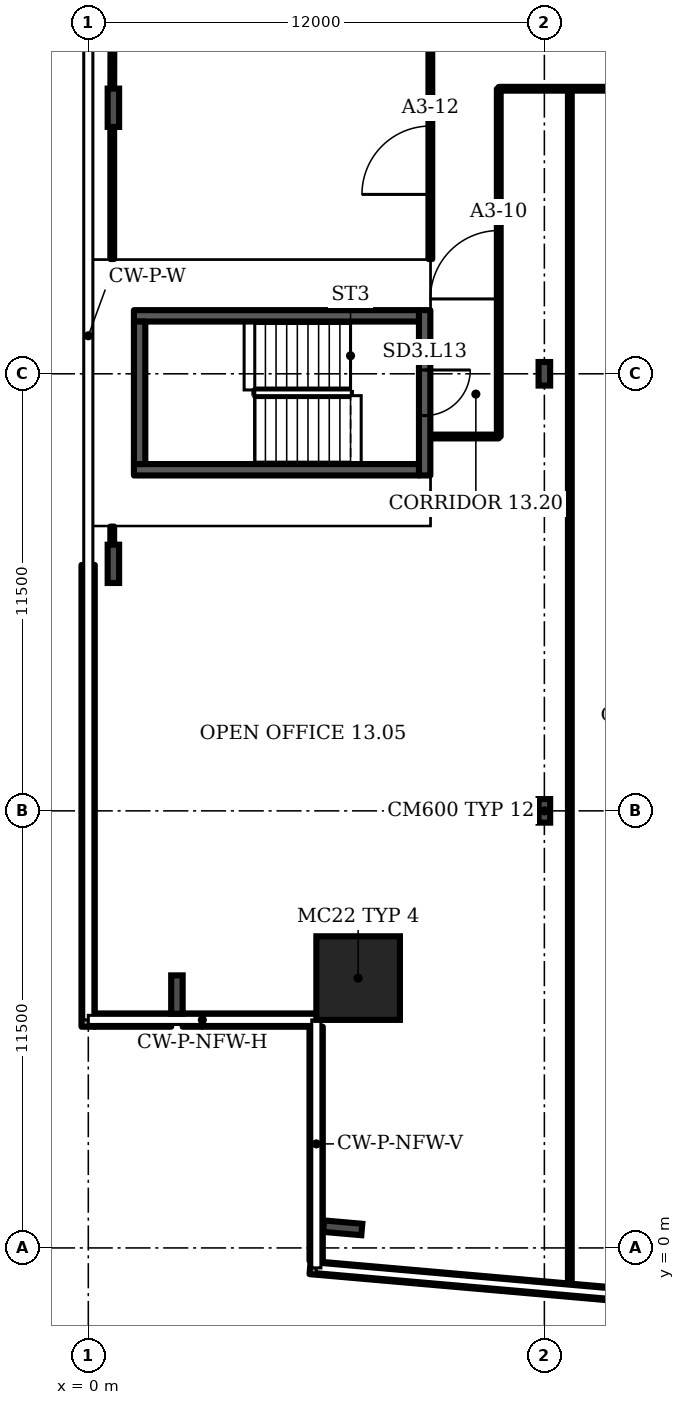
"""IFC4 building model, lengths in metres.
Left out: names, types, materials, properties, quantities, classifications, styles, units other than length and angle.
Written with IfcOpenShell. Run it as: python <this file> out.ifc"""

import sys

from ifc_helpers import new_model, si_unit, direction, frame, frame_2d, origin, origin_2d, place, context, subcontext, project, spatial, rectangle, i_section, extrude, element, fill, save


model = new_model("IFC4")
c1 = context("Model", 3, precision=1e-05, world=origin(), true_north=direction((0.0, 1.0)))
c2 = subcontext(c1, "Body", "Model", "MODEL_VIEW")
j1 = project(units=[si_unit("LENGTHUNIT", "METRE"), si_unit("PLANEANGLEUNIT", "RADIAN")], contexts=[c1])
p1 = place(None, origin())
s1 = spatial("IfcSite", under=j1, at=p1, CompositionType="ELEMENT")
p2 = place(p1, origin())
s2 = spatial("IfcBuilding", under=s1, at=p2, CompositionType="ELEMENT")
p3 = place(p2, frame((0.0, 0.0, 66.7)))
s3 = spatial("IfcBuildingStorey", under=s2, at=p3, CompositionType="ELEMENT", Elevation=66.7)
p4 = place(p3, frame((7.1, 7.1, 0.0), z_axis=(0.0, 0.0, 1.0), x_axis=(1.0, 0.0, 0.0)))
e1 = element("IfcColumn", 1, at=p4, inside=s3, PredefinedType="COLUMN", context=c2, shape_type="SweptSolid", body=[
    extrude(rectangle(XDim=2.2, YDim=2.2, at=origin_2d()), origin(), (0.0, 0.0, 1.0), 3.6),
])
for number, where, z_axis, x_axis in (
    (2, (6.694, 0.529, 0.0), (0.0, 0.0, 1.0), (-0.087, -0.996, 0.0)),
    (3, (0.66, 30.0, 0.0), (0.0, 0.0, 1.0), (-1.0, 0.0, 0.0)),
    (4, (0.66, 18.0, 0.0), (0.0, 0.0, 1.0), (-1.0, 0.0, 0.0)),
    (5, (2.332, 6.667, 0.0), (0.0, 0.0, 1.0), (-1.0, 0.0, 0.0)),
):
    element("IfcColumn", number, at=place(p3, frame(where, z_axis=z_axis, x_axis=x_axis)), inside=s3, PredefinedType="COLUMN", context=c2, shape_type="SweptSolid", body=[
        extrude(i_section(OverallWidth=0.302, OverallDepth=1.008, WebThickness=0.021, FlangeThickness=0.04, FilletRadius=0.03, at=origin_2d()), origin(), (0.0, 0.0, 1.0), 3.6),
    ])
for number, where, z_axis, x_axis in (
    (6, (12.0, 11.5, 0.0), (0.0, 0.0, 1.0), (1.0, 0.0, 0.0)),
    (7, (12.0, 23.0, 0.0), (0.0, 0.0, 1.0), (1.0, 0.0, 0.0)),
):
    element("IfcColumn", number, at=place(p3, frame(where, z_axis=z_axis, x_axis=x_axis)), inside=s3, PredefinedType="COLUMN", context=c2, shape_type="SweptSolid", body=[
        extrude(i_section(OverallWidth=0.305, OverallDepth=0.62, WebThickness=0.021, FlangeThickness=0.04, FilletRadius=0.027, at=origin_2d()), origin(), (0.0, 0.0, 1.0), 3.6),
    ])
p5 = place(p3, frame((5.835, -0.516, 0.0), z_axis=(0.0, 0.0, 1.0), x_axis=(0.996192, -0.087142, 0.0)))
e8 = element("IfcWall", 8, at=p5, inside=s3, PredefinedType="SOLIDWALL", context=c2, shape_type="SweptSolid", body=[
    extrude(rectangle(XDim=11.607, YDim=0.35, at=frame_2d((5.804, 0.0))), origin(), (0.0, 0.0, 1.0), 1.0),
])
p6 = place(p3, frame((-0.005, 17.97, 0.0), z_axis=(0.0, 0.0, 1.0), x_axis=(0.0, -1.0, 0.0)))
e9 = element("IfcWall", 9, at=p6, inside=s3, PredefinedType="SOLIDWALL", context=c2, shape_type="SweptSolid", body=[
    extrude(rectangle(XDim=12.15, YDim=0.35, at=frame_2d((6.075, 0.0))), origin(), (0.0, 0.0, 1.0), 1.0),
])
p7 = place(p3, frame((0.17, 5.995, 0.0), z_axis=(0.0, 0.0, 1.0), x_axis=(1.0, 0.0, 0.0)))
e10 = element("IfcWall", 10, at=p7, inside=s3, PredefinedType="SOLIDWALL", context=c2, shape_type="SweptSolid", body=[
    extrude(rectangle(XDim=2.011, YDim=0.35, at=frame_2d((1.005, 0.0))), origin(), (0.0, 0.0, 1.0), 1.0),
])
p8 = place(p3, frame((2.483, 5.995, 0.0), z_axis=(0.0, 0.0, 1.0), x_axis=(1.0, 0.0, 0.0)))
e11 = element("IfcWall", 11, at=p8, inside=s3, PredefinedType="SOLIDWALL", context=c2, shape_type="SweptSolid", body=[
    extrude(rectangle(XDim=3.517, YDim=0.35, at=frame_2d((1.759, 0.0))), origin(), (0.0, 0.0, 1.0), 1.0),
])
p9 = place(p3, frame((5.995, 5.82, 0.0), z_axis=(0.0, 0.0, 1.0), x_axis=(0.0, -1.0, 0.0)))
e12 = element("IfcWall", 12, at=p9, inside=s3, PredefinedType="SOLIDWALL", context=c2, shape_type="SweptSolid", body=[
    extrude(rectangle(XDim=6.161, YDim=0.35, at=frame_2d((3.081, 0.0))), origin(), (0.0, 0.0, 1.0), 1.0),
])
p10 = place(p3, frame((8.85, 20.325, 0.0), z_axis=(0.0, 0.0, 1.0), x_axis=(0.0, 1.0, 0.0)))
e13 = element("IfcWall", 13, at=p10, inside=s3, PredefinedType="SHEAR", context=c2, shape_type="SweptSolid", body=[
    extrude(rectangle(XDim=4.35, YDim=0.3, at=frame_2d((2.175, 0.0))), origin(), (0.0, 0.0, 1.0), 3.2),
])
p11 = place(p10, frame((1.575, 0.0, 0.0)))
e14 = element("IfcOpeningElement", 14, at=p11, cuts=e13, PredefinedType="OPENING", context=c2, shape_type="SweptSolid", body=[
    extrude(rectangle(XDim=1.2, YDim=2.1, at=frame_2d((0.6, 1.05))), frame((0.0, 0.16, 0.0), z_axis=(0.0, -1.0, 0.0), x_axis=(1.0, 0.0, 0.0)), (0.0, 0.0, 1.0), 0.32),
])
p12 = place(p3, frame((0.63, 17.5, 0.0), z_axis=(0.0, 0.0, 1.0), x_axis=(0.0, 1.0, 0.0)))
e15 = element("IfcWall", 15, at=p12, inside=s3, PredefinedType="PARTITIONING", context=c2, shape_type="SweptSolid", body=[
    extrude(rectangle(XDim=1.48, YDim=0.1, at=frame_2d((0.74, 0.0))), origin(), (0.0, 0.0, 1.0), 2.58),
])
p13 = place(p3, frame((0.63, 26.02, 0.0), z_axis=(0.0, 0.0, 1.0), x_axis=(0.0, 1.0, 0.0)))
e16 = element("IfcWall", 16, at=p13, inside=s3, PredefinedType="PARTITIONING", context=c2, shape_type="SweptSolid", body=[
    extrude(rectangle(XDim=3.98, YDim=0.1, at=frame_2d((1.99, 0.0))), origin(), (0.0, 0.0, 1.0), 2.58),
])
p14 = place(p3, frame((0.63, 30.0, 0.0), z_axis=(0.0, 0.0, 1.0), x_axis=(0.00218, 0.999994, 0.0)))
e17 = element("IfcWall", 17, at=p14, inside=s3, PredefinedType="PARTITIONING", context=c2, shape_type="SweptSolid", body=[
    extrude(rectangle(XDim=11.535, YDim=0.1, at=frame_2d((5.768, 0.0))), origin(), (0.0, 0.0, 1.0), 2.58),
])
p15 = place(p3, frame((9.0, 26.02, 0.0), z_axis=(0.0, 0.0, 1.0), x_axis=(0.0, 1.0, 0.0)))
e18 = element("IfcWall", 18, at=p15, inside=s3, PredefinedType="PARTITIONING", context=c2, shape_type="SweptSolid", body=[
    extrude(rectangle(XDim=7.96, YDim=0.1, at=frame_2d((3.98, 0.0))), origin(), (0.0, 0.0, 1.0), 3.2),
])
p16 = place(p15, frame((1.7, 0.0, 0.0)))
e19 = element("IfcOpeningElement", 19, at=p16, cuts=e18, PredefinedType="OPENING", context=c2, shape_type="SweptSolid", body=[
    extrude(rectangle(XDim=1.8, YDim=2.1, at=frame_2d((0.9, 1.05))), frame((0.0, 0.06, 0.0), z_axis=(0.0, -1.0, 0.0), x_axis=(1.0, 0.0, 0.0)), (0.0, 0.0, 1.0), 0.12),
])
p17 = place(p3, frame((9.02, 21.35, 0.0), z_axis=(0.0, 0.0, 1.0), x_axis=(1.0, 0.0, 0.0)))
e20 = element("IfcWall", 20, at=p17, inside=s3, PredefinedType="PARTITIONING", context=c2, shape_type="SweptSolid", body=[
    extrude(rectangle(XDim=1.78, YDim=0.1, at=frame_2d((0.89, 0.0))), origin(), (0.0, 0.0, 1.0), 3.2),
])
p18 = place(p3, frame((10.8, 21.35, 0.0), z_axis=(0.0, 0.0, 1.0), x_axis=(0.0, 1.0, 0.0)))
e21 = element("IfcWall", 21, at=p18, inside=s3, PredefinedType="PARTITIONING", context=c2, shape_type="SweptSolid", body=[
    extrude(rectangle(XDim=9.15, YDim=0.1, at=frame_2d((4.575, 0.0))), origin(), (0.0, 0.0, 1.0), 3.2),
])
p19 = place(p18, frame((3.62, 0.0, 0.0)))
e22 = element("IfcOpeningElement", 22, at=p19, cuts=e21, PredefinedType="OPENING", context=c2, shape_type="SweptSolid", body=[
    extrude(rectangle(XDim=1.8, YDim=2.1, at=frame_2d((0.9, 1.05))), frame((0.0, 0.06, 0.0), z_axis=(0.0, -1.0, 0.0), x_axis=(1.0, 0.0, 0.0)), (0.0, 0.0, 1.0), 0.12),
])
p20 = place(p3, frame((10.8, 30.5, 0.0), z_axis=(0.0, 0.0, 1.0), x_axis=(1.0, 0.0, 0.0)))
e23 = element("IfcWall", 23, at=p20, inside=s3, PredefinedType="PARTITIONING", context=c2, shape_type="SweptSolid", body=[
    extrude(rectangle(XDim=26.05, YDim=0.1, at=frame_2d((13.025, 0.0))), origin(), (0.0, 0.0, 1.0), 3.2),
])
p21 = place(p20, frame((4.09, 0.0, 0.0)))
e24 = element("IfcOpeningElement", 24, at=p21, cuts=e23, PredefinedType="OPENING", context=c2, shape_type="SweptSolid", body=[
    extrude(rectangle(XDim=1.0, YDim=2.1, at=frame_2d((0.5, 1.05))), frame((0.0, 0.06, 0.0), z_axis=(0.0, -1.0, 0.0), x_axis=(1.0, 0.0, 0.0)), (0.0, 0.0, 1.0), 0.12),
])
p22 = place(p20, frame((9.5, 0.0, 0.0)))
e25 = element("IfcOpeningElement", 25, at=p22, cuts=e23, PredefinedType="OPENING", context=c2, shape_type="SweptSolid", body=[
    extrude(rectangle(XDim=1.0, YDim=2.1, at=frame_2d((0.5, 1.05))), frame((0.0, 0.06, 0.0), z_axis=(0.0, -1.0, 0.0), x_axis=(1.0, 0.0, 0.0)), (0.0, 0.0, 1.0), 0.12),
])
p23 = place(p20, frame((14.755, 0.0, 0.0)))
e26 = element("IfcOpeningElement", 26, at=p23, cuts=e23, PredefinedType="OPENING", context=c2, shape_type="SweptSolid", body=[
    extrude(rectangle(XDim=1.0, YDim=2.1, at=frame_2d((0.5, 1.05))), frame((0.0, 0.06, 0.0), z_axis=(0.0, -1.0, 0.0), x_axis=(1.0, 0.0, 0.0)), (0.0, 0.0, 1.0), 0.12),
])
p24 = place(p20, frame((21.49, 0.0, 0.0)))
e27 = element("IfcOpeningElement", 27, at=p24, cuts=e23, PredefinedType="OPENING", context=c2, shape_type="SweptSolid", body=[
    extrude(rectangle(XDim=1.0, YDim=2.1, at=frame_2d((0.5, 1.05))), frame((0.0, 0.06, 0.0), z_axis=(0.0, -1.0, 0.0), x_axis=(1.0, 0.0, 0.0)), (0.0, 0.0, 1.0), 0.12),
])
p25 = place(p3, frame((12.67, -1.088, 0.0), z_axis=(0.0, 0.0, 1.0), x_axis=(0.0, 1.0, 0.0)))
e28 = element("IfcWall", 28, at=p25, inside=s3, PredefinedType="PARTITIONING", context=c2, shape_type="SweptSolid", body=[
    extrude(rectangle(XDim=31.588, YDim=0.1, at=frame_2d((15.794, 0.0))), origin(), (0.0, 0.0, 1.0), 3.2),
])
for number, where, z_axis, x_axis in (
    (29, (1.2, 20.475, 0.0), (0.0, 0.0, 1.0), (1.0, 0.0, 0.0)),
    (30, (1.2, 24.525, 0.0), (0.0, 0.0, 1.0), (1.0, 0.0, 0.0)),
):
    element("IfcWall", number, at=place(p3, frame(where, z_axis=z_axis, x_axis=x_axis)), inside=s3, PredefinedType="SHEAR", context=c2, shape_type="SweptSolid", body=[
        extrude(rectangle(XDim=7.5, YDim=0.3, at=frame_2d((3.75, 0.0))), origin(), (0.0, 0.0, 1.0), 3.2),
    ])
p26 = place(p3, frame((1.35, 20.625, 0.0), z_axis=(0.0, 0.0, 1.0), x_axis=(0.0, 1.0, 0.0)))
e31 = element("IfcWall", 31, at=p26, inside=s3, PredefinedType="SHEAR", context=c2, shape_type="SweptSolid", body=[
    extrude(rectangle(XDim=3.75, YDim=0.3, at=frame_2d((1.875, 0.0))), origin(), (0.0, 0.0, 1.0), 3.2),
])
p27 = place(p11, origin())
e32 = element("IfcDoor", 32, at=p27, inside=s3, OperationType="SINGLE_SWING_RIGHT", PredefinedType="DOOR", context=c2, shape_type="SweptSolid", body=[
    extrude(rectangle(XDim=1.2, YDim=2.1, at=frame_2d((0.6, 1.05))), frame((0.0, 0.025, 0.0), z_axis=(0.0, -1.0, 0.0), x_axis=(1.0, 0.0, 0.0)), (0.0, 0.0, 1.0), 0.05),
])
fill(e14, e32)
p28 = place(p19, origin())
e33 = element("IfcDoor", 33, at=p28, inside=s3, OperationType="DOUBLE_DOOR_SINGLE_SWING", PredefinedType="DOOR", context=c2, shape_type="SweptSolid", body=[
    extrude(rectangle(XDim=1.8, YDim=2.1, at=frame_2d((0.9, 1.05))), frame((0.0, 0.025, 0.0), z_axis=(0.0, -1.0, 0.0), x_axis=(1.0, 0.0, 0.0)), (0.0, 0.0, 1.0), 0.05),
])
fill(e22, e33)
p29 = place(p16, origin())
e34 = element("IfcDoor", 34, at=p29, inside=s3, OperationType="DOUBLE_DOOR_SINGLE_SWING", PredefinedType="DOOR", context=c2, shape_type="SweptSolid", body=[
    extrude(rectangle(XDim=1.8, YDim=2.1, at=frame_2d((0.9, 1.05))), frame((0.0, 0.025, 0.0), z_axis=(0.0, -1.0, 0.0), x_axis=(1.0, 0.0, 0.0)), (0.0, 0.0, 1.0), 0.05),
])
fill(e19, e34)
save(model, sys.argv[1])
